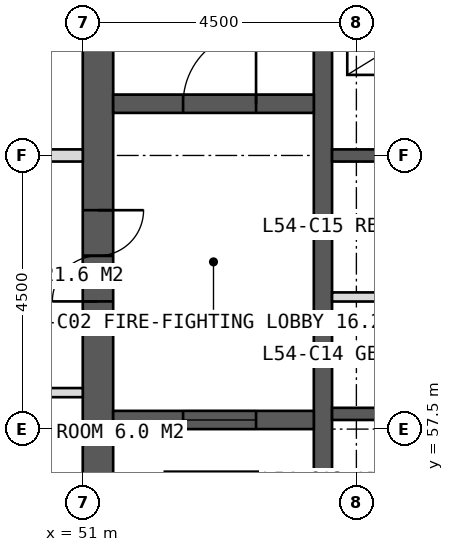
"""IFC4 building model, lengths in metres.
Left out: names, types, materials, properties, quantities, classifications, styles, units other than length and angle.
Written with IfcOpenShell. Run it as: python <this file> out.ifc"""

import sys

from ifc_helpers import new_model, si_unit, direction, frame, frame_2d, origin, place, context, subcontext, project, spatial, rectangle, extrude, element, fill, save


model = new_model("IFC4")
c1 = context("Model", 3, precision=1e-05, world=origin(), true_north=direction((0.0, 1.0)))
c2 = subcontext(c1, "Body", "Model", "MODEL_VIEW")
j1 = project(units=[si_unit("LENGTHUNIT", "METRE"), si_unit("PLANEANGLEUNIT", "RADIAN")], contexts=[c1])
p1 = place(None, origin())
s1 = spatial("IfcSite", under=j1, at=p1, CompositionType="ELEMENT")
p2 = place(p1, origin())
s2 = spatial("IfcBuilding", under=s1, at=p2, CompositionType="ELEMENT")
p3 = place(p2, frame((0.0, 0.0, 225.0)))
s3 = spatial("IfcBuildingStorey", under=s2, at=p3, CompositionType="ELEMENT", Elevation=225.0)
p4 = place(p3, frame((51.25, 53.5, 0.0), z_axis=(0.0, 0.0, 1.0), x_axis=(0.0, 1.0, 0.0)))
e1 = element("IfcWall", 1, at=p4, inside=s3, PredefinedType="SHEAR", context=c2, shape_type="SweptSolid", body=[
    extrude(rectangle(XDim=17.0, YDim=0.5, at=frame_2d((8.5, 0.0))), origin(), (0.0, 0.0, 1.0), 4.0),
])
p5 = place(p4, frame((6.1, 0.0, 0.0)))
e2 = element("IfcOpeningElement", 2, at=p5, cuts=e1, PredefinedType="OPENING", context=c2, shape_type="SweptSolid", body=[
    extrude(rectangle(XDim=1.5, YDim=2.2, at=frame_2d((0.75, 1.1))), frame((0.0, 0.26, 0.0), z_axis=(0.0, -1.0, 0.0), x_axis=(1.0, 0.0, 0.0)), (0.0, 0.0, 1.0), 0.52),
])
p6 = place(p3, frame((54.95, 53.5, 0.0), z_axis=(0.0, 0.0, 1.0), x_axis=(0.0, 1.0, 0.0)))
e3 = element("IfcWall", 3, at=p6, inside=s3, PredefinedType="SHEAR", context=c2, shape_type="SweptSolid", body=[
    extrude(rectangle(XDim=17.0, YDim=0.3, at=frame_2d((8.5, 0.0))), origin(), (0.0, 0.0, 1.0), 4.0),
])
for number, where, z_axis, x_axis in (
    (4, (55.1, 57.75, 0.0), (0.0, 0.0, 1.0), (1.0, 0.0, 0.0)),
    (5, (55.1, 62.0, 0.0), (0.0, 0.0, 1.0), (1.0, 0.0, 0.0)),
):
    element("IfcWall", number, at=place(p3, frame(where, z_axis=z_axis, x_axis=x_axis)), inside=s3, PredefinedType="SHEAR", context=c2, shape_type="SweptSolid", body=[
        extrude(rectangle(XDim=3.05, YDim=0.2, at=frame_2d((1.525, 0.0))), origin(), (0.0, 0.0, 1.0), 4.0),
    ])
p7 = place(p3, frame((51.5, 62.85, 0.0), z_axis=(0.0, 0.0, 1.0), x_axis=(1.0, 0.0, 0.0)))
e6 = element("IfcWall", 6, at=p7, inside=s3, PredefinedType="SHEAR", context=c2, shape_type="SweptSolid", body=[
    extrude(rectangle(XDim=3.3, YDim=0.3, at=frame_2d((1.65, 0.0))), origin(), (0.0, 0.0, 1.0), 4.0),
])
p8 = place(p7, frame((1.15, 0.0, 0.0)))
e7 = element("IfcOpeningElement", 7, at=p8, cuts=e6, PredefinedType="OPENING", context=c2, shape_type="SweptSolid", body=[
    extrude(rectangle(XDim=1.2, YDim=2.1, at=frame_2d((0.6, 1.05))), frame((0.0, 0.16, 0.0), z_axis=(0.0, -1.0, 0.0), x_axis=(1.0, 0.0, 0.0)), (0.0, 0.0, 1.0), 0.32),
])
p9 = place(p3, frame((51.5, 57.65, 0.0), z_axis=(0.0, 0.0, 1.0), x_axis=(1.0, 0.0, 0.0)))
e8 = element("IfcWall", 8, at=p9, inside=s3, PredefinedType="SHEAR", context=c2, shape_type="SweptSolid", body=[
    extrude(rectangle(XDim=3.3, YDim=0.3, at=frame_2d((1.65, 0.0))), origin(), (0.0, 0.0, 1.0), 4.0),
])
p10 = place(p9, frame((1.15, 0.0, 0.0)))
e9 = element("IfcOpeningElement", 9, at=p10, cuts=e8, PredefinedType="OPENING", context=c2, shape_type="SweptSolid", body=[
    extrude(rectangle(XDim=1.2, YDim=2.2, at=frame_2d((0.6, 1.1))), frame((0.0, 0.16, 0.0), z_axis=(0.0, -1.0, 0.0), x_axis=(1.0, 0.0, 0.0)), (0.0, 0.0, 1.0), 0.32),
])
p11 = place(p3, frame((51.0, 58.1, 0.0), z_axis=(0.0, 0.0, 1.0), x_axis=(-1.0, 0.0, 0.0)))
e10 = element("IfcWall", 10, at=p11, inside=s3, PredefinedType="PARTITIONING", context=c2, shape_type="SweptSolid", body=[
    extrude(rectangle(XDim=5.4, YDim=0.15, at=frame_2d((2.7, 0.0))), origin(), (0.0, 0.0, 1.0), 3.75),
])
p12 = place(p11, frame((0.6, 0.0, 0.0)))
e11 = element("IfcOpeningElement", 11, at=p12, cuts=e10, PredefinedType="OPENING", context=c2, shape_type="SweptSolid", body=[
    extrude(rectangle(XDim=0.9, YDim=2.1, at=frame_2d((0.45, 1.05))), frame((0.0, 0.085, 0.0), z_axis=(0.0, -1.0, 0.0), x_axis=(1.0, 0.0, 0.0)), (0.0, 0.0, 1.0), 0.17),
])
p13 = place(p3, frame((51.0, 62.0, 0.0), z_axis=(0.0, 0.0, 1.0), x_axis=(-1.0, 0.0, 0.0)))
e12 = element("IfcWall", 12, at=p13, inside=s3, PredefinedType="SOLIDWALL", context=c2, shape_type="SweptSolid", body=[
    extrude(rectangle(XDim=5.4, YDim=0.2, at=frame_2d((2.7, 0.0))), origin(), (0.0, 0.0, 1.0), 2.95),
])
p14 = place(p3, frame((55.1, 59.673, 0.0), z_axis=(0.0, 0.0, 1.0), x_axis=(1.0, 0.0, 0.0)))
e13 = element("IfcWall", 13, at=p14, inside=s3, PredefinedType="PARTITIONING", context=c2, shape_type="SweptSolid", body=[
    extrude(rectangle(XDim=3.05, YDim=0.15, at=frame_2d((1.525, 0.0))), origin(), (0.0, 0.0, 1.0), 3.75),
])
p15 = place(p5, origin())
e14 = element("IfcDoor", 14, at=p15, inside=s3, OperationType="DOUBLE_DOOR_SINGLE_SWING", PredefinedType="DOOR", context=c2, shape_type="SweptSolid", body=[
    extrude(rectangle(XDim=1.5, YDim=2.2, at=frame_2d((0.75, 1.1))), frame((0.0, 0.025, 0.0), z_axis=(0.0, -1.0, 0.0), x_axis=(1.0, 0.0, 0.0)), (0.0, 0.0, 1.0), 0.05),
])
fill(e2, e14)
p16 = place(p8, origin())
e15 = element("IfcDoor", 15, at=p16, inside=s3, OperationType="SINGLE_SWING_RIGHT", PredefinedType="DOOR", context=c2, shape_type="SweptSolid", body=[
    extrude(rectangle(XDim=1.2, YDim=2.1, at=frame_2d((0.6, 1.05))), frame((0.0, 0.025, 0.0), z_axis=(0.0, -1.0, 0.0), x_axis=(1.0, 0.0, 0.0)), (0.0, 0.0, 1.0), 0.05),
])
fill(e7, e15)
p17 = place(p10, origin())
e16 = element("IfcDoor", 16, at=p17, inside=s3, OperationType="SLIDING_TO_LEFT", PredefinedType="DOOR", context=c2, shape_type="SweptSolid", body=[
    extrude(rectangle(XDim=1.2, YDim=2.2, at=frame_2d((0.6, 1.1))), frame((0.0, 0.025, 0.0), z_axis=(0.0, -1.0, 0.0), x_axis=(1.0, 0.0, 0.0)), (0.0, 0.0, 1.0), 0.05),
])
fill(e9, e16)
save(model, sys.argv[1])
